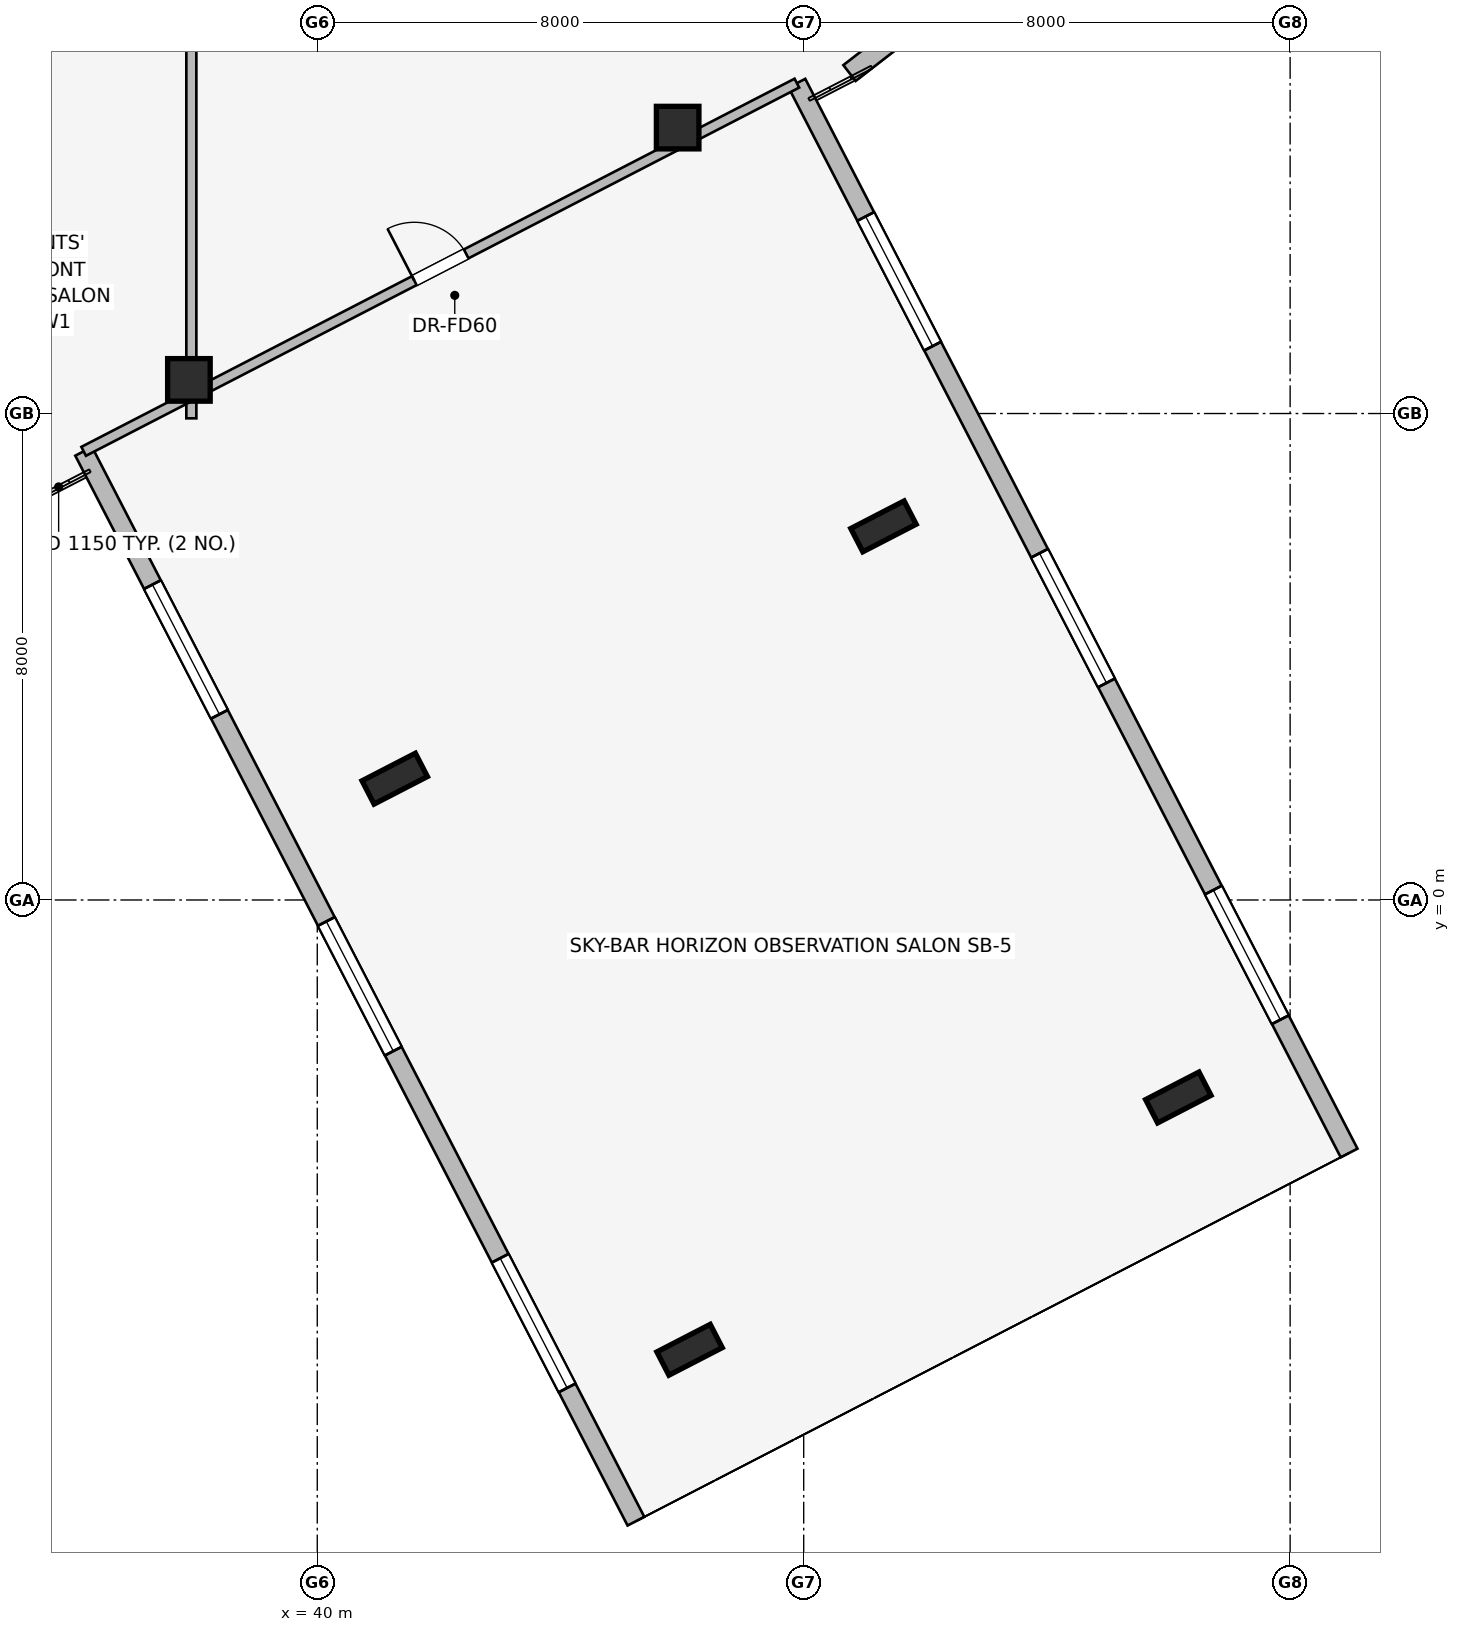
"""IFC4 building model, lengths in metres.
Left out: names, types, materials, properties, quantities, classifications, styles, units other than length and angle.
Written with IfcOpenShell. Run it as: python <this file> out.ifc"""

import sys

from ifc_helpers import new_model, si_unit, direction, frame, frame_2d, origin, origin_2d, place, context, subcontext, project, spatial, rectangle, i_section, extrude, element, fill, save


model = new_model("IFC4")
c1 = context("Model", 3, precision=1e-05, world=origin(), true_north=direction((0.0, 1.0)))
c2 = subcontext(c1, "Body", "Model", "MODEL_VIEW")
j1 = project(units=[si_unit("LENGTHUNIT", "METRE"), si_unit("PLANEANGLEUNIT", "RADIAN")], contexts=[c1])
p1 = place(None, origin())
s1 = spatial("IfcSite", under=j1, at=p1, CompositionType="ELEMENT")
p2 = place(p1, origin())
s2 = spatial("IfcBuilding", under=s1, at=p2, CompositionType="ELEMENT")
p3 = place(p2, frame((0.0, 0.0, 241.9)))
s3 = spatial("IfcBuildingStorey", under=s2, at=p3, CompositionType="ELEMENT", Elevation=241.9)
for number, where, z_axis, x_axis in (
    (1, (37.889, 8.553, 0.0), (0.0, 0.0, 1.0), (1.0, 0.0, 0.0)),
    (2, (45.927, 12.702, 0.0), (0.0, 0.0, 1.0), (1.0, 0.0, 0.0)),
):
    element("IfcColumn", number, at=place(p3, frame(where, z_axis=z_axis, x_axis=x_axis)), inside=s3, PredefinedType="COLUMN", context=c2, shape_type="SweptSolid", body=[
        extrude(rectangle(XDim=0.7, YDim=0.7, at=origin_2d()), origin(), (0.0, 0.0, 1.0), 3.55),
    ])
for number, where, z_axis, x_axis in (
    (3, (41.274, 1.995, 0.0), (0.0, 0.0, 1.0), (0.459, -0.889, 0.0)),
    (4, (49.312, 6.144, 0.0), (0.0, 0.0, 1.0), (0.459, -0.889, 0.0)),
    (5, (46.123, -7.397, 0.0), (0.0, 0.0, 1.0), (0.459, -0.889, 0.0)),
    (6, (54.161, -3.248, 0.0), (0.0, 0.0, 1.0), (0.459, -0.889, 0.0)),
):
    element("IfcColumn", number, at=place(p3, frame(where, z_axis=z_axis, x_axis=x_axis)), inside=s3, PredefinedType="COLUMN", context=c2, shape_type="SweptSolid", body=[
        extrude(i_section(OverallWidth=0.431, OverallDepth=0.987, WebThickness=0.034, FlangeThickness=0.062, at=origin_2d()), origin(), (0.0, 0.0, 1.0), 3.55),
    ])
p4 = place(p3, frame((45.241, -10.216, 0.0), z_axis=(0.0, 0.0, 1.0), x_axis=(-0.45873211625, 0.888574614493, 0.0)))
e7 = element("IfcWall", 7, at=p4, inside=s3, PredefinedType="STANDARD", context=c2, shape_type="SweptSolid", body=[
    extrude(rectangle(XDim=19.8, YDim=0.31, at=frame_2d((9.9, 0.0))), origin(), (0.0, 0.0, 1.0), 3.29),
])
p5 = place(p4, frame((2.467, 0.0, 0.75)))
e8 = element("IfcOpeningElement", 8, at=p5, cuts=e7, PredefinedType="OPENING", context=c2, shape_type="SweptSolid", body=[
    extrude(rectangle(XDim=2.4, YDim=1.6, at=frame_2d((1.2, 0.8))), frame((0.0, 0.165, 0.0), z_axis=(0.0, -1.0, 0.0), x_axis=(1.0, 0.0, 0.0)), (0.0, 0.0, 1.0), 0.33),
])
p6 = place(p4, frame((8.7, 0.0, 0.75)))
e9 = element("IfcOpeningElement", 9, at=p6, cuts=e7, PredefinedType="OPENING", context=c2, shape_type="SweptSolid", body=[
    extrude(rectangle(XDim=2.4, YDim=1.6, at=frame_2d((1.2, 0.8))), frame((0.0, 0.165, 0.0), z_axis=(0.0, -1.0, 0.0), x_axis=(1.0, 0.0, 0.0)), (0.0, 0.0, 1.0), 0.33),
])
p7 = place(p4, frame((14.934, 0.0, 0.75)))
e10 = element("IfcOpeningElement", 10, at=p7, cuts=e7, PredefinedType="OPENING", context=c2, shape_type="SweptSolid", body=[
    extrude(rectangle(XDim=2.4, YDim=1.6, at=frame_2d((1.2, 0.8))), frame((0.0, 0.165, 0.0), z_axis=(0.0, -1.0, 0.0), x_axis=(1.0, 0.0, 0.0)), (0.0, 0.0, 1.0), 0.33),
])
p8 = place(p3, frame((47.888, 13.433, 0.0), z_axis=(0.0, 0.0, 1.0), x_axis=(0.458693173014, -0.888594718097, 0.0)))
e11 = element("IfcWall", 11, at=p8, inside=s3, PredefinedType="STANDARD", context=c2, shape_type="SweptSolid", body=[
    extrude(rectangle(XDim=19.8, YDim=0.31, at=frame_2d((9.9, 0.0))), origin(), (0.0, 0.0, 1.0), 3.29),
])
p9 = place(p8, frame((2.467, 0.0, 0.75)))
e12 = element("IfcOpeningElement", 12, at=p9, cuts=e11, PredefinedType="OPENING", context=c2, shape_type="SweptSolid", body=[
    extrude(rectangle(XDim=2.4, YDim=1.6, at=frame_2d((1.2, 0.8))), frame((0.0, 0.165, 0.0), z_axis=(0.0, -1.0, 0.0), x_axis=(1.0, 0.0, 0.0)), (0.0, 0.0, 1.0), 0.33),
])
p10 = place(p8, frame((8.7, 0.0, 0.75)))
e13 = element("IfcOpeningElement", 13, at=p10, cuts=e11, PredefinedType="OPENING", context=c2, shape_type="SweptSolid", body=[
    extrude(rectangle(XDim=2.4, YDim=1.6, at=frame_2d((1.2, 0.8))), frame((0.0, 0.165, 0.0), z_axis=(0.0, -1.0, 0.0), x_axis=(1.0, 0.0, 0.0)), (0.0, 0.0, 1.0), 0.33),
])
p11 = place(p8, frame((14.933, 0.0, 0.75)))
e14 = element("IfcOpeningElement", 14, at=p11, cuts=e11, PredefinedType="OPENING", context=c2, shape_type="SweptSolid", body=[
    extrude(rectangle(XDim=2.4, YDim=1.6, at=frame_2d((1.2, 0.8))), frame((0.0, 0.165, 0.0), z_axis=(0.0, -1.0, 0.0), x_axis=(1.0, 0.0, 0.0)), (0.0, 0.0, 1.0), 0.33),
])
p12 = place(p3, frame((50.078, 14.625, 0.0), z_axis=(0.0, 0.0, 1.0), x_axis=(-0.790691856293, -0.61221433207, 0.0)))
e15 = element("IfcWall", 15, at=p12, inside=s3, PredefinedType="STANDARD", context=c2, shape_type="SweptSolid", body=[
    extrude(rectangle(XDim=1.676, YDim=0.33, at=frame_2d((0.838, 0.0))), origin(), (0.0, 0.0, 1.0), 3.29),
])
p13 = place(p3, frame((37.929, 7.921, 0.0), z_axis=(0.0, 0.0, 1.0), x_axis=(0.0, 1.0, 0.0)))
e16 = element("IfcWall", 16, at=p13, inside=s3, PredefinedType="PARTITIONING", context=c2, shape_type="SweptSolid", body=[
    extrude(rectangle(XDim=8.549, YDim=0.165, at=frame_2d((4.274, 0.0))), origin(), (0.0, 0.0, 1.0), 2.679),
])
p14 = place(p3, frame((36.158, 7.378, 0.0), z_axis=(0.0, 0.0, 1.0), x_axis=(0.88859001822, 0.458702277648, 0.0)))
e17 = element("IfcWall", 17, at=p14, inside=s3, PredefinedType="PARTITIONING", context=c2, shape_type="SweptSolid", body=[
    extrude(rectangle(XDim=13.201, YDim=0.165, at=frame_2d((6.6, 0.0))), origin(), (0.0, 0.0, 1.0), 2.741),
])
p15 = place(p14, frame((6.12, 0.0, 0.0)))
e18 = element("IfcOpeningElement", 18, at=p15, cuts=e17, PredefinedType="OPENING", context=c2, shape_type="SweptSolid", body=[
    extrude(rectangle(XDim=0.96, YDim=2.0, at=frame_2d((0.48, 1.0))), frame((0.0, 0.093, 0.0), z_axis=(0.0, -1.0, 0.0), x_axis=(1.0, 0.0, 0.0)), (0.0, 0.0, 1.0), 0.185),
])
p16 = place(p5, origin())
e19 = element("IfcWindow", 19, at=p16, inside=s3, PartitioningType="SINGLE_PANEL", PredefinedType="WINDOW", context=c2, shape_type="SweptSolid", body=[
    extrude(rectangle(XDim=2.4, YDim=1.6, at=frame_2d((1.2, 0.8))), frame((0.0, 0.03, 0.0), z_axis=(0.0, -1.0, 0.0), x_axis=(1.0, 0.0, 0.0)), (0.0, 0.0, 1.0), 0.06),
])
fill(e8, e19)
p17 = place(p6, origin())
e20 = element("IfcWindow", 20, at=p17, inside=s3, PartitioningType="SINGLE_PANEL", PredefinedType="WINDOW", context=c2, shape_type="SweptSolid", body=[
    extrude(rectangle(XDim=2.4, YDim=1.6, at=frame_2d((1.2, 0.8))), frame((0.0, 0.03, 0.0), z_axis=(0.0, -1.0, 0.0), x_axis=(1.0, 0.0, 0.0)), (0.0, 0.0, 1.0), 0.06),
])
fill(e9, e20)
p18 = place(p7, origin())
e21 = element("IfcWindow", 21, at=p18, inside=s3, PartitioningType="SINGLE_PANEL", PredefinedType="WINDOW", context=c2, shape_type="SweptSolid", body=[
    extrude(rectangle(XDim=2.4, YDim=1.6, at=frame_2d((1.2, 0.8))), frame((0.0, 0.03, 0.0), z_axis=(0.0, -1.0, 0.0), x_axis=(1.0, 0.0, 0.0)), (0.0, 0.0, 1.0), 0.06),
])
fill(e10, e21)
p19 = place(p9, origin())
e22 = element("IfcWindow", 22, at=p19, inside=s3, PartitioningType="SINGLE_PANEL", PredefinedType="WINDOW", context=c2, shape_type="SweptSolid", body=[
    extrude(rectangle(XDim=2.4, YDim=1.6, at=frame_2d((1.2, 0.8))), frame((0.0, 0.03, 0.0), z_axis=(0.0, -1.0, 0.0), x_axis=(1.0, 0.0, 0.0)), (0.0, 0.0, 1.0), 0.06),
])
fill(e12, e22)
p20 = place(p10, origin())
e23 = element("IfcWindow", 23, at=p20, inside=s3, PartitioningType="SINGLE_PANEL", PredefinedType="WINDOW", context=c2, shape_type="SweptSolid", body=[
    extrude(rectangle(XDim=2.4, YDim=1.6, at=frame_2d((1.2, 0.8))), frame((0.0, 0.03, 0.0), z_axis=(0.0, -1.0, 0.0), x_axis=(1.0, 0.0, 0.0)), (0.0, 0.0, 1.0), 0.06),
])
fill(e13, e23)
p21 = place(p11, origin())
e24 = element("IfcWindow", 24, at=p21, inside=s3, PartitioningType="SINGLE_PANEL", PredefinedType="WINDOW", context=c2, shape_type="SweptSolid", body=[
    extrude(rectangle(XDim=2.4, YDim=1.6, at=frame_2d((1.2, 0.8))), frame((0.0, 0.03, 0.0), z_axis=(0.0, -1.0, 0.0), x_axis=(1.0, 0.0, 0.0)), (0.0, 0.0, 1.0), 0.06),
])
fill(e14, e24)
p22 = place(p15, origin())
e25 = element("IfcDoor", 25, at=p22, inside=s3, OperationType="SINGLE_SWING_LEFT", PredefinedType="DOOR", context=c2, shape_type="SweptSolid", body=[
    extrude(rectangle(XDim=0.96, YDim=2.0, at=frame_2d((0.48, 1.0))), frame((0.0, 0.025, 0.0), z_axis=(0.0, -1.0, 0.0), x_axis=(1.0, 0.0, 0.0)), (0.0, 0.0, 1.0), 0.05),
])
fill(e18, e25)
save(model, sys.argv[1])
